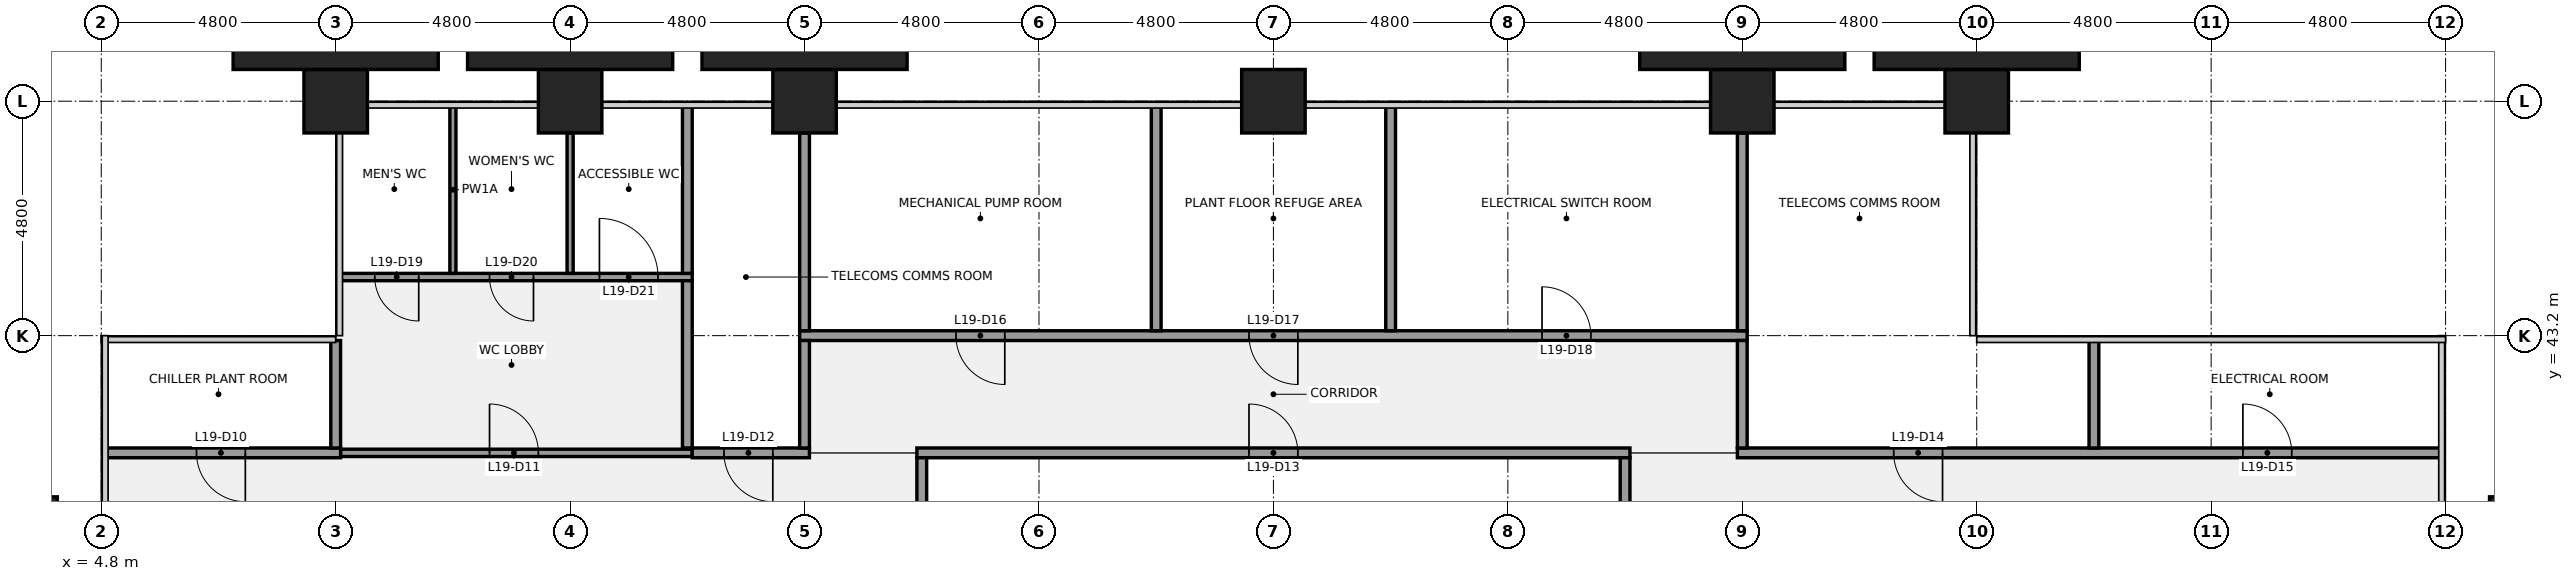
"""IFC4 building model, lengths in metres.
Left out: names, types, materials, properties, quantities, classifications, styles, units other than length and angle.
Written with IfcOpenShell. Run it as: python <this file> out.ifc"""

import sys

from ifc_helpers import new_model, si_unit, direction, frame, frame_2d, origin, origin_2d, place, context, subcontext, project, spatial, rectangle, extrude, element, fill, save


model = new_model("IFC4")
c1 = context("Model", 3, precision=1e-05, world=origin(), true_north=direction((0.0, 1.0)))
c2 = subcontext(c1, "Body", "Model", "MODEL_VIEW")
j1 = project(units=[si_unit("LENGTHUNIT", "METRE"), si_unit("PLANEANGLEUNIT", "RADIAN")], contexts=[c1])
p1 = place(None, origin())
s1 = spatial("IfcSite", under=j1, at=p1, CompositionType="ELEMENT")
p2 = place(p1, origin())
s2 = spatial("IfcBuilding", under=s1, at=p2, CompositionType="ELEMENT")
p3 = place(p2, frame((0.0, 0.0, 87.0)))
s3 = spatial("IfcBuildingStorey", under=s2, at=p3, CompositionType="ELEMENT", Elevation=87.0)
for number, where, z_axis, x_axis in (
    (1, (9.6, 48.0, 0.0), (0.0, 0.0, 1.0), (1.0, 0.0, 0.0)),
    (2, (14.4, 48.0, 0.0), (0.0, 0.0, 1.0), (1.0, 0.0, 0.0)),
    (3, (19.2, 48.0, 0.0), (0.0, 0.0, 1.0), (1.0, 0.0, 0.0)),
    (4, (28.8, 48.0, 0.0), (0.0, 0.0, 1.0), (1.0, 0.0, 0.0)),
    (5, (38.4, 48.0, 0.0), (0.0, 0.0, 1.0), (1.0, 0.0, 0.0)),
    (6, (43.2, 48.0, 0.0), (0.0, 0.0, 1.0), (1.0, 0.0, 0.0)),
):
    element("IfcColumn", number, at=place(p3, frame(where, z_axis=z_axis, x_axis=x_axis)), inside=s3, PredefinedType="COLUMN", context=c2, shape_type="SweptSolid", body=[
        extrude(rectangle(XDim=1.3, YDim=1.3, at=origin_2d()), origin(), (0.0, 0.0, 1.0), 4.5),
    ])
p4 = place(p3, frame((9.7, 40.8, 0.0), z_axis=(0.0, 0.0, 1.0), x_axis=(1.0, 0.0, 0.0)))
e7 = element("IfcWall", 7, at=p4, inside=s3, PredefinedType="PARTITIONING", context=c2, shape_type="SweptSolid", body=[
    extrude(rectangle(XDim=7.2, YDim=0.15, at=frame_2d((3.6, 0.0))), origin(), (0.0, 0.0, 1.0), 2.993),
])
p5 = place(p4, frame((3.05, 0.0, 0.0)))
e8 = element("IfcOpeningElement", 8, at=p5, cuts=e7, PredefinedType="OPENING", context=c2, shape_type="SweptSolid", body=[
    extrude(rectangle(XDim=1.0, YDim=2.1, at=frame_2d((0.5, 1.05))), frame((0.0, 0.085, 0.0), z_axis=(0.0, -1.0, 0.0), x_axis=(1.0, 0.0, 0.0)), (0.0, 0.0, 1.0), 0.17),
])
p6 = place(p3, frame((4.9, 40.8, 0.0), z_axis=(0.0, 0.0, 1.0), x_axis=(1.0, 0.0, 0.0)))
e9 = element("IfcWall", 9, at=p6, inside=s3, PredefinedType="PARTITIONING", context=c2, shape_type="SweptSolid", body=[
    extrude(rectangle(XDim=4.8, YDim=0.2, at=frame_2d((2.4, 0.0))), origin(), (0.0, 0.0, 1.0), 2.993),
])
p7 = place(p6, frame((1.85, 0.0, 0.0)))
e10 = element("IfcOpeningElement", 10, at=p7, cuts=e9, PredefinedType="OPENING", context=c2, shape_type="SweptSolid", body=[
    extrude(rectangle(XDim=1.0, YDim=2.1, at=frame_2d((0.5, 1.05))), frame((0.0, 0.11, 0.0), z_axis=(0.0, -1.0, 0.0), x_axis=(1.0, 0.0, 0.0)), (0.0, 0.0, 1.0), 0.22),
])
p8 = place(p3, frame((16.9, 40.8, 0.0), z_axis=(0.0, 0.0, 1.0), x_axis=(1.0, 0.0, 0.0)))
e11 = element("IfcWall", 11, at=p8, inside=s3, PredefinedType="PARTITIONING", context=c2, shape_type="SweptSolid", body=[
    extrude(rectangle(XDim=2.4, YDim=0.2, at=frame_2d((1.2, 0.0))), origin(), (0.0, 0.0, 1.0), 2.993),
])
p9 = place(p8, frame((0.65, 0.0, 0.0)))
e12 = element("IfcOpeningElement", 12, at=p9, cuts=e11, PredefinedType="OPENING", context=c2, shape_type="SweptSolid", body=[
    extrude(rectangle(XDim=1.0, YDim=2.1, at=frame_2d((0.5, 1.05))), frame((0.0, 0.11, 0.0), z_axis=(0.0, -1.0, 0.0), x_axis=(1.0, 0.0, 0.0)), (0.0, 0.0, 1.0), 0.22),
])
p10 = place(p3, frame((21.5, 40.8, 0.0), z_axis=(0.0, 0.0, 1.0), x_axis=(1.0, 0.0, 0.0)))
e13 = element("IfcWall", 13, at=p10, inside=s3, PredefinedType="PARTITIONING", context=c2, shape_type="SweptSolid", body=[
    extrude(rectangle(XDim=14.6, YDim=0.2, at=frame_2d((7.3, 0.0))), origin(), (0.0, 0.0, 1.0), 2.993),
])
p11 = place(p10, frame((6.8, 0.0, 0.0)))
e14 = element("IfcOpeningElement", 14, at=p11, cuts=e13, PredefinedType="OPENING", context=c2, shape_type="SweptSolid", body=[
    extrude(rectangle(XDim=1.0, YDim=2.1, at=frame_2d((0.5, 1.05))), frame((0.0, 0.11, 0.0), z_axis=(0.0, -1.0, 0.0), x_axis=(1.0, 0.0, 0.0)), (0.0, 0.0, 1.0), 0.22),
])
p12 = place(p3, frame((38.3, 40.8, 0.0), z_axis=(0.0, 0.0, 1.0), x_axis=(1.0, 0.0, 0.0)))
e15 = element("IfcWall", 15, at=p12, inside=s3, PredefinedType="PARTITIONING", context=c2, shape_type="SweptSolid", body=[
    extrude(rectangle(XDim=14.4, YDim=0.2, at=frame_2d((7.2, 0.0))), origin(), (0.0, 0.0, 1.0), 2.993),
])
p13 = place(p12, frame((3.2, 0.0, 0.0)))
e16 = element("IfcOpeningElement", 16, at=p13, cuts=e15, PredefinedType="OPENING", context=c2, shape_type="SweptSolid", body=[
    extrude(rectangle(XDim=1.0, YDim=2.1, at=frame_2d((0.5, 1.05))), frame((0.0, 0.11, 0.0), z_axis=(0.0, -1.0, 0.0), x_axis=(1.0, 0.0, 0.0)), (0.0, 0.0, 1.0), 0.22),
])
p14 = place(p12, frame((10.35, 0.0, 0.0)))
e17 = element("IfcOpeningElement", 17, at=p14, cuts=e15, PredefinedType="OPENING", context=c2, shape_type="SweptSolid", body=[
    extrude(rectangle(XDim=1.0, YDim=2.1, at=frame_2d((0.5, 1.05))), frame((0.0, 0.11, 0.0), z_axis=(0.0, -1.0, 0.0), x_axis=(1.0, 0.0, 0.0)), (0.0, 0.0, 1.0), 0.22),
])
p15 = place(p3, frame((19.1, 43.2, 0.0), z_axis=(0.0, 0.0, 1.0), x_axis=(1.0, 0.0, 0.0)))
e18 = element("IfcWall", 18, at=p15, inside=s3, PredefinedType="PARTITIONING", context=c2, shape_type="SweptSolid", body=[
    extrude(rectangle(XDim=19.4, YDim=0.2, at=frame_2d((9.7, 0.0))), origin(), (0.0, 0.0, 1.0), 2.993),
])
p16 = place(p15, frame((3.2, 0.0, 0.0)))
e19 = element("IfcOpeningElement", 19, at=p16, cuts=e18, PredefinedType="OPENING", context=c2, shape_type="SweptSolid", body=[
    extrude(rectangle(XDim=1.0, YDim=2.1, at=frame_2d((0.5, 1.05))), frame((0.0, 0.11, 0.0), z_axis=(0.0, -1.0, 0.0), x_axis=(1.0, 0.0, 0.0)), (0.0, 0.0, 1.0), 0.22),
])
p17 = place(p15, frame((9.2, 0.0, 0.0)))
e20 = element("IfcOpeningElement", 20, at=p17, cuts=e18, PredefinedType="OPENING", context=c2, shape_type="SweptSolid", body=[
    extrude(rectangle(XDim=1.0, YDim=2.1, at=frame_2d((0.5, 1.05))), frame((0.0, 0.11, 0.0), z_axis=(0.0, -1.0, 0.0), x_axis=(1.0, 0.0, 0.0)), (0.0, 0.0, 1.0), 0.22),
])
p18 = place(p15, frame((15.2, 0.0, 0.0)))
e21 = element("IfcOpeningElement", 21, at=p18, cuts=e18, PredefinedType="OPENING", context=c2, shape_type="SweptSolid", body=[
    extrude(rectangle(XDim=1.0, YDim=2.1, at=frame_2d((0.5, 1.05))), frame((0.0, 0.11, 0.0), z_axis=(0.0, -1.0, 0.0), x_axis=(1.0, 0.0, 0.0)), (0.0, 0.0, 1.0), 0.22),
])
p19 = place(p3, frame((9.7, 44.4, 0.0), z_axis=(0.0, 0.0, 1.0), x_axis=(1.0, 0.0, 0.0)))
e22 = element("IfcWall", 22, at=p19, inside=s3, PredefinedType="PARTITIONING", context=c2, shape_type="SweptSolid", body=[
    extrude(rectangle(XDim=7.2, YDim=0.15, at=frame_2d((3.6, 0.0))), origin(), (0.0, 0.0, 1.0), 2.993),
])
p20 = place(p19, frame((0.7, 0.0, 0.0)))
e23 = element("IfcOpeningElement", 23, at=p20, cuts=e22, PredefinedType="OPENING", context=c2, shape_type="SweptSolid", body=[
    extrude(rectangle(XDim=0.9, YDim=2.1, at=frame_2d((0.45, 1.05))), frame((0.0, 0.085, 0.0), z_axis=(0.0, -1.0, 0.0), x_axis=(1.0, 0.0, 0.0)), (0.0, 0.0, 1.0), 0.17),
])
p21 = place(p19, frame((3.05, 0.0, 0.0)))
e24 = element("IfcOpeningElement", 24, at=p21, cuts=e22, PredefinedType="OPENING", context=c2, shape_type="SweptSolid", body=[
    extrude(rectangle(XDim=0.9, YDim=2.1, at=frame_2d((0.45, 1.05))), frame((0.0, 0.085, 0.0), z_axis=(0.0, -1.0, 0.0), x_axis=(1.0, 0.0, 0.0)), (0.0, 0.0, 1.0), 0.17),
])
p22 = place(p19, frame((5.3, 0.0, 0.0)))
e25 = element("IfcOpeningElement", 25, at=p22, cuts=e22, PredefinedType="OPENING", context=c2, shape_type="SweptSolid", body=[
    extrude(rectangle(XDim=1.2, YDim=2.1, at=frame_2d((0.6, 1.05))), frame((0.0, 0.085, 0.0), z_axis=(0.0, -1.0, 0.0), x_axis=(1.0, 0.0, 0.0)), (0.0, 0.0, 1.0), 0.17),
])
p23 = place(p3, frame((9.6, 40.9, 0.0), z_axis=(0.0, 0.0, 1.0), x_axis=(0.0, 1.0, 0.0)))
e26 = element("IfcWall", 26, at=p23, inside=s3, PredefinedType="PARTITIONING", context=c2, shape_type="SweptSolid", body=[
    extrude(rectangle(XDim=2.2, YDim=0.2, at=frame_2d((1.1, 0.0))), origin(), (0.0, 0.0, 1.0), 2.993),
])
p24 = place(p3, frame((12.0, 44.475, 0.0), z_axis=(0.0, 0.0, 1.0), x_axis=(0.0, 1.0, 0.0)))
e27 = element("IfcWall", 27, at=p24, inside=s3, PredefinedType="PARTITIONING", context=c2, shape_type="SweptSolid", body=[
    extrude(rectangle(XDim=3.425, YDim=0.125, at=frame_2d((1.712, 0.0))), origin(), (0.0, 0.0, 1.0), 2.993),
])
p25 = place(p3, frame((14.4, 44.475, 0.0), z_axis=(0.0, 0.0, 1.0), x_axis=(0.0, 1.0, 0.0)))
e28 = element("IfcWall", 28, at=p25, inside=s3, PredefinedType="PARTITIONING", context=c2, shape_type="SweptSolid", body=[
    extrude(rectangle(XDim=2.875, YDim=0.125, at=frame_2d((1.438, 0.0))), origin(), (0.0, 0.0, 1.0), 2.993),
])
p26 = place(p3, frame((16.8, 40.9, 0.0), z_axis=(0.0, 0.0, 1.0), x_axis=(0.0, 1.0, 0.0)))
e29 = element("IfcWall", 29, at=p26, inside=s3, PredefinedType="PARTITIONING", context=c2, shape_type="SweptSolid", body=[
    extrude(rectangle(XDim=3.425, YDim=0.2, at=frame_2d((1.712, 0.0))), origin(), (0.0, 0.0, 1.0), 2.993),
])
p27 = place(p3, frame((16.8, 44.475, 0.0), z_axis=(0.0, 0.0, 1.0), x_axis=(0.0, 1.0, 0.0)))
e30 = element("IfcWall", 30, at=p27, inside=s3, PredefinedType="PARTITIONING", context=c2, shape_type="SweptSolid", body=[
    extrude(rectangle(XDim=3.425, YDim=0.2, at=frame_2d((1.712, 0.0))), origin(), (0.0, 0.0, 1.0), 2.993),
])
p28 = place(p3, frame((19.2, 40.9, 0.0), z_axis=(0.0, 0.0, 1.0), x_axis=(0.0, 1.0, 0.0)))
e31 = element("IfcWall", 31, at=p28, inside=s3, PredefinedType="PARTITIONING", context=c2, shape_type="SweptSolid", body=[
    extrude(rectangle(XDim=2.2, YDim=0.2, at=frame_2d((1.1, 0.0))), origin(), (0.0, 0.0, 1.0), 2.993),
])
p29 = place(p3, frame((19.2, 43.3, 0.0), z_axis=(0.0, 0.0, 1.0), x_axis=(0.0, 1.0, 0.0)))
e32 = element("IfcWall", 32, at=p29, inside=s3, PredefinedType="PARTITIONING", context=c2, shape_type="SweptSolid", body=[
    extrude(rectangle(XDim=4.05, YDim=0.2, at=frame_2d((2.025, 0.0))), origin(), (0.0, 0.0, 1.0), 2.993),
])
for number, where, z_axis, x_axis in (
    (33, (21.6, 36.1, 0.0), (0.0, 0.0, 1.0), (0.0, 1.0, 0.0)),
    (34, (26.4, 43.3, 0.0), (0.0, 0.0, 1.0), (0.0, 1.0, 0.0)),
    (35, (31.2, 43.3, 0.0), (0.0, 0.0, 1.0), (0.0, 1.0, 0.0)),
    (36, (36.0, 36.1, 0.0), (0.0, 0.0, 1.0), (0.0, 1.0, 0.0)),
):
    element("IfcWall", number, at=place(p3, frame(where, z_axis=z_axis, x_axis=x_axis)), inside=s3, PredefinedType="PARTITIONING", context=c2, shape_type="SweptSolid", body=[
        extrude(rectangle(XDim=4.6, YDim=0.2, at=frame_2d((2.3, 0.0))), origin(), (0.0, 0.0, 1.0), 2.993),
    ])
p30 = place(p3, frame((38.4, 40.9, 0.0), z_axis=(0.0, 0.0, 1.0), x_axis=(0.0, 1.0, 0.0)))
e37 = element("IfcWall", 37, at=p30, inside=s3, PredefinedType="PARTITIONING", context=c2, shape_type="SweptSolid", body=[
    extrude(rectangle(XDim=2.2, YDim=0.2, at=frame_2d((1.1, 0.0))), origin(), (0.0, 0.0, 1.0), 2.993),
])
p31 = place(p3, frame((38.4, 43.3, 0.0), z_axis=(0.0, 0.0, 1.0), x_axis=(0.0, 1.0, 0.0)))
e38 = element("IfcWall", 38, at=p31, inside=s3, PredefinedType="PARTITIONING", context=c2, shape_type="SweptSolid", body=[
    extrude(rectangle(XDim=4.05, YDim=0.2, at=frame_2d((2.025, 0.0))), origin(), (0.0, 0.0, 1.0), 2.993),
])
p32 = place(p3, frame((45.6, 40.9, 0.0), z_axis=(0.0, 0.0, 1.0), x_axis=(0.0, 1.0, 0.0)))
e39 = element("IfcWall", 39, at=p32, inside=s3, PredefinedType="PARTITIONING", context=c2, shape_type="SweptSolid", body=[
    extrude(rectangle(XDim=2.2, YDim=0.2, at=frame_2d((1.1, 0.0))), origin(), (0.0, 0.0, 1.0), 2.993),
])
for number, where, z_axis, x_axis in (
    (40, (55.2, 39.15, 0.0), (0.0, 0.0, 1.0), (1.0, 0.0, 0.0)),
    (41, (2.4, 39.15, 0.0), (0.0, 0.0, 1.0), (1.0, 0.0, 0.0)),
):
    element("IfcColumn", number, at=place(p3, frame(where, z_axis=z_axis, x_axis=x_axis)), inside=s3, PredefinedType="PILASTER", context=c2, shape_type="SweptSolid", body=[
        extrude(rectangle(XDim=3.0, YDim=1.5, at=origin_2d()), origin(), (0.0, 0.0, 1.0), 4.5),
    ])
for number, where, z_axis, x_axis in (
    (42, (9.6, 49.075, 0.0), (0.0, 0.0, 1.0), (1.0, 0.0, 0.0)),
    (43, (14.4, 49.075, 0.0), (0.0, 0.0, 1.0), (1.0, 0.0, 0.0)),
    (44, (19.2, 49.075, 0.0), (0.0, 0.0, 1.0), (1.0, 0.0, 0.0)),
    (45, (38.4, 49.075, 0.0), (0.0, 0.0, 1.0), (1.0, 0.0, 0.0)),
    (46, (43.2, 49.075, 0.0), (0.0, 0.0, 1.0), (1.0, 0.0, 0.0)),
):
    element("IfcColumn", number, at=place(p3, frame(where, z_axis=z_axis, x_axis=x_axis)), inside=s3, PredefinedType="PILASTER", context=c2, shape_type="SweptSolid", body=[
        extrude(rectangle(XDim=4.2, YDim=0.85, at=origin_2d()), origin(), (0.0, 0.0, 1.0), 4.5),
    ])
p33 = place(p7, origin())
e47 = element("IfcDoor", 47, at=p33, inside=s3, OperationType="SINGLE_SWING_RIGHT", PredefinedType="DOOR", context=c2, shape_type="SweptSolid", body=[
    extrude(rectangle(XDim=1.0, YDim=2.1, at=frame_2d((0.5, 1.05))), frame((0.0, 0.025, 0.0), z_axis=(0.0, -1.0, 0.0), x_axis=(1.0, 0.0, 0.0)), (0.0, 0.0, 1.0), 0.05),
])
fill(e10, e47)
p34 = place(p5, origin())
e48 = element("IfcDoor", 48, at=p34, inside=s3, OperationType="SINGLE_SWING_LEFT", PredefinedType="DOOR", context=c2, shape_type="SweptSolid", body=[
    extrude(rectangle(XDim=1.0, YDim=2.1, at=frame_2d((0.5, 1.05))), frame((0.0, 0.025, 0.0), z_axis=(0.0, -1.0, 0.0), x_axis=(1.0, 0.0, 0.0)), (0.0, 0.0, 1.0), 0.05),
])
fill(e8, e48)
p35 = place(p9, origin())
e49 = element("IfcDoor", 49, at=p35, inside=s3, OperationType="SINGLE_SWING_RIGHT", PredefinedType="DOOR", context=c2, shape_type="SweptSolid", body=[
    extrude(rectangle(XDim=1.0, YDim=2.1, at=frame_2d((0.5, 1.05))), frame((0.0, 0.025, 0.0), z_axis=(0.0, -1.0, 0.0), x_axis=(1.0, 0.0, 0.0)), (0.0, 0.0, 1.0), 0.05),
])
fill(e12, e49)
p36 = place(p11, origin())
e50 = element("IfcDoor", 50, at=p36, inside=s3, OperationType="SINGLE_SWING_LEFT", PredefinedType="DOOR", context=c2, shape_type="SweptSolid", body=[
    extrude(rectangle(XDim=1.0, YDim=2.1, at=frame_2d((0.5, 1.05))), frame((0.0, 0.025, 0.0), z_axis=(0.0, -1.0, 0.0), x_axis=(1.0, 0.0, 0.0)), (0.0, 0.0, 1.0), 0.05),
])
fill(e14, e50)
p37 = place(p13, origin())
e51 = element("IfcDoor", 51, at=p37, inside=s3, OperationType="SINGLE_SWING_RIGHT", PredefinedType="DOOR", context=c2, shape_type="SweptSolid", body=[
    extrude(rectangle(XDim=1.0, YDim=2.1, at=frame_2d((0.5, 1.05))), frame((0.0, 0.025, 0.0), z_axis=(0.0, -1.0, 0.0), x_axis=(1.0, 0.0, 0.0)), (0.0, 0.0, 1.0), 0.05),
])
fill(e16, e51)
p38 = place(p14, origin())
e52 = element("IfcDoor", 52, at=p38, inside=s3, OperationType="SINGLE_SWING_LEFT", PredefinedType="DOOR", context=c2, shape_type="SweptSolid", body=[
    extrude(rectangle(XDim=1.0, YDim=2.1, at=frame_2d((0.5, 1.05))), frame((0.0, 0.025, 0.0), z_axis=(0.0, -1.0, 0.0), x_axis=(1.0, 0.0, 0.0)), (0.0, 0.0, 1.0), 0.05),
])
fill(e17, e52)
p39 = place(p16, origin())
e53 = element("IfcDoor", 53, at=p39, inside=s3, OperationType="SINGLE_SWING_RIGHT", PredefinedType="DOOR", context=c2, shape_type="SweptSolid", body=[
    extrude(rectangle(XDim=1.0, YDim=2.1, at=frame_2d((0.5, 1.05))), frame((0.0, 0.025, 0.0), z_axis=(0.0, -1.0, 0.0), x_axis=(1.0, 0.0, 0.0)), (0.0, 0.0, 1.0), 0.05),
])
fill(e19, e53)
p40 = place(p17, origin())
e54 = element("IfcDoor", 54, at=p40, inside=s3, OperationType="SINGLE_SWING_RIGHT", PredefinedType="DOOR", context=c2, shape_type="SweptSolid", body=[
    extrude(rectangle(XDim=1.0, YDim=2.1, at=frame_2d((0.5, 1.05))), frame((0.0, 0.025, 0.0), z_axis=(0.0, -1.0, 0.0), x_axis=(1.0, 0.0, 0.0)), (0.0, 0.0, 1.0), 0.05),
])
fill(e20, e54)
p41 = place(p18, origin())
e55 = element("IfcDoor", 55, at=p41, inside=s3, OperationType="SINGLE_SWING_LEFT", PredefinedType="DOOR", context=c2, shape_type="SweptSolid", body=[
    extrude(rectangle(XDim=1.0, YDim=2.1, at=frame_2d((0.5, 1.05))), frame((0.0, 0.025, 0.0), z_axis=(0.0, -1.0, 0.0), x_axis=(1.0, 0.0, 0.0)), (0.0, 0.0, 1.0), 0.05),
])
fill(e21, e55)
p42 = place(p20, origin())
e56 = element("IfcDoor", 56, at=p42, inside=s3, OperationType="SINGLE_SWING_RIGHT", PredefinedType="DOOR", context=c2, shape_type="SweptSolid", body=[
    extrude(rectangle(XDim=0.9, YDim=2.1, at=frame_2d((0.45, 1.05))), frame((0.0, 0.025, 0.0), z_axis=(0.0, -1.0, 0.0), x_axis=(1.0, 0.0, 0.0)), (0.0, 0.0, 1.0), 0.05),
])
fill(e23, e56)
p43 = place(p21, origin())
e57 = element("IfcDoor", 57, at=p43, inside=s3, OperationType="SINGLE_SWING_RIGHT", PredefinedType="DOOR", context=c2, shape_type="SweptSolid", body=[
    extrude(rectangle(XDim=0.9, YDim=2.1, at=frame_2d((0.45, 1.05))), frame((0.0, 0.025, 0.0), z_axis=(0.0, -1.0, 0.0), x_axis=(1.0, 0.0, 0.0)), (0.0, 0.0, 1.0), 0.05),
])
fill(e24, e57)
p44 = place(p22, origin())
e58 = element("IfcDoor", 58, at=p44, inside=s3, OperationType="SINGLE_SWING_LEFT", PredefinedType="DOOR", context=c2, shape_type="SweptSolid", body=[
    extrude(rectangle(XDim=1.2, YDim=2.1, at=frame_2d((0.6, 1.05))), frame((0.0, 0.025, 0.0), z_axis=(0.0, -1.0, 0.0), x_axis=(1.0, 0.0, 0.0)), (0.0, 0.0, 1.0), 0.05),
])
fill(e25, e58)
save(model, sys.argv[1])
